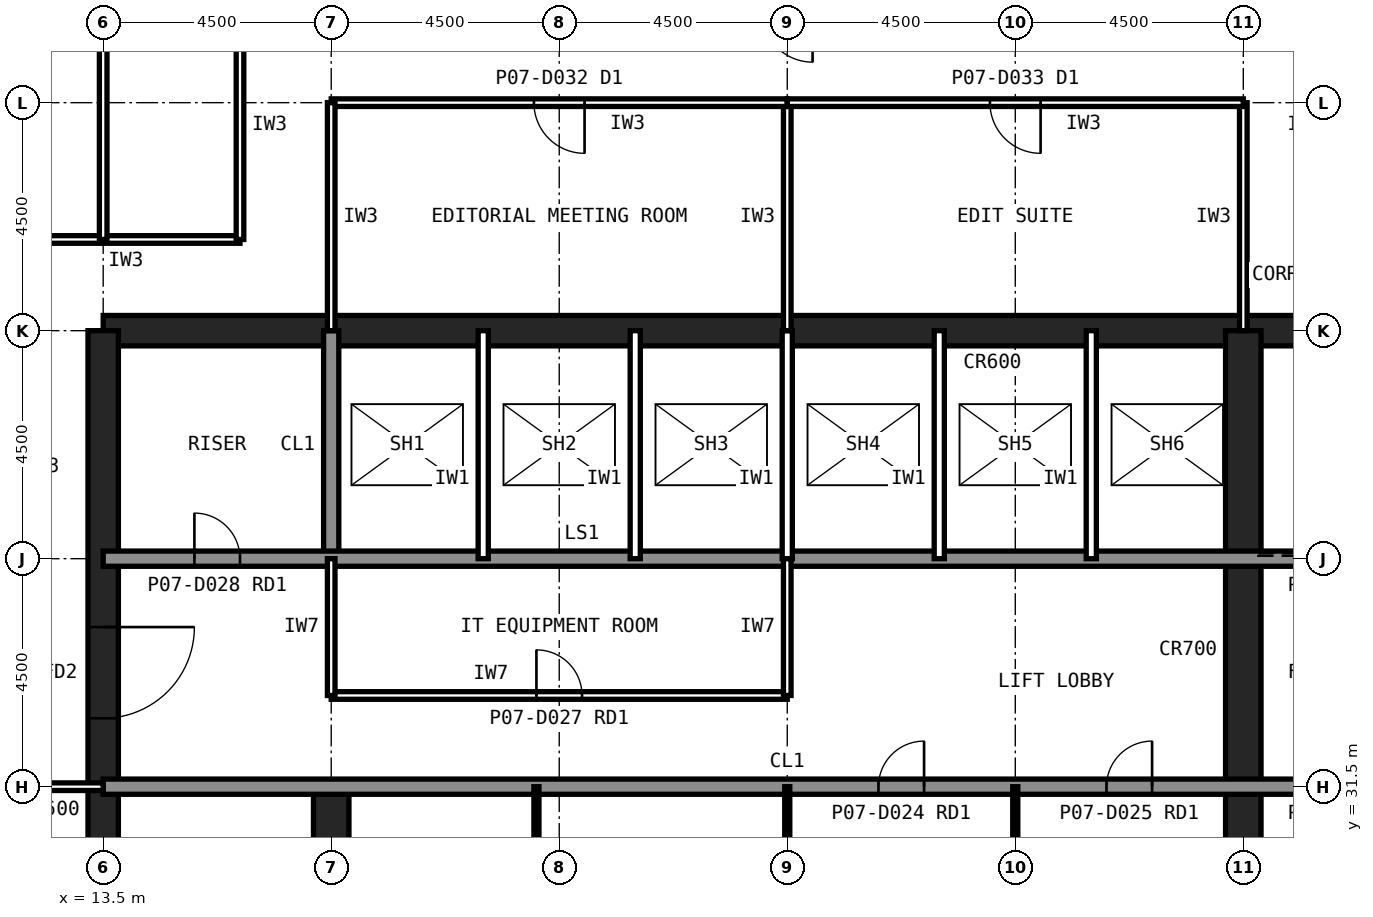
"""IFC4 building model, lengths in metres.
Left out: names, types, materials, properties, quantities, classifications, styles, units other than length and angle.
Written with IfcOpenShell. Run it as: python <this file> out.ifc"""

import sys

from ifc_helpers import new_model, si_unit, direction, frame, frame_2d, origin, place, context, subcontext, project, spatial, rectangle, extrude, element, fill, save


model = new_model("IFC4")
c1 = context("Model", 3, precision=1e-05, world=origin(), true_north=direction((0.0, 1.0)))
c2 = subcontext(c1, "Body", "Model", "MODEL_VIEW")
j1 = project(units=[si_unit("LENGTHUNIT", "METRE"), si_unit("PLANEANGLEUNIT", "RADIAN")], contexts=[c1])
p1 = place(None, origin())
s1 = spatial("IfcSite", under=j1, at=p1, CompositionType="ELEMENT")
p2 = place(p1, origin())
s2 = spatial("IfcBuilding", under=s1, at=p2, CompositionType="ELEMENT")
p3 = place(p2, frame((0.0, 0.0, 33.2)))
s3 = spatial("IfcBuildingStorey", under=s2, at=p3, CompositionType="ELEMENT", Elevation=33.2)
p4 = place(p3, frame((40.5, 40.5, 0.0), z_axis=(0.0, 0.0, 1.0), x_axis=(-1.0, 0.0, 0.0)))
e1 = element("IfcWall", 1, at=p4, inside=s3, PredefinedType="SHEAR", context=c2, shape_type="SweptSolid", body=[
    extrude(rectangle(XDim=27.0, YDim=0.6, at=frame_2d((13.5, 0.0))), origin(), (0.0, 0.0, 1.0), 4.2),
])
p5 = place(p3, frame((13.5, 40.5, 0.0), z_axis=(0.0, 0.0, 1.0), x_axis=(0.0, -1.0, 0.0)))
e2 = element("IfcWall", 2, at=p5, inside=s3, PredefinedType="SHEAR", context=c2, shape_type="SweptSolid", body=[
    extrude(rectangle(XDim=27.0, YDim=0.6, at=frame_2d((13.5, 0.0))), origin(), (0.0, 0.0, 1.0), 4.2),
])
p6 = place(p5, frame((19.65, 0.0, 0.0)))
e3 = element("IfcOpeningElement", 3, at=p6, cuts=e2, PredefinedType="OPENING", context=c2, shape_type="SweptSolid", body=[
    extrude(rectangle(XDim=1.2, YDim=2.1, at=frame_2d((0.6, 1.05))), frame((0.0, 0.31, 0.0), z_axis=(0.0, -1.0, 0.0), x_axis=(1.0, 0.0, 0.0)), (0.0, 0.0, 1.0), 0.62),
])
p7 = place(p5, frame((5.85, 0.0, 0.0)))
e4 = element("IfcOpeningElement", 4, at=p7, cuts=e2, PredefinedType="OPENING", context=c2, shape_type="SweptSolid", body=[
    extrude(rectangle(XDim=1.8, YDim=2.1, at=frame_2d((0.9, 1.05))), frame((0.0, 0.31, 0.0), z_axis=(0.0, -1.0, 0.0), x_axis=(1.0, 0.0, 0.0)), (0.0, 0.0, 1.0), 0.62),
])
p8 = place(p3, frame((18.0, 13.5, 0.0), z_axis=(0.0, 0.0, 1.0), x_axis=(0.0, 1.0, 0.0)))
e5 = element("IfcWall", 5, at=p8, inside=s3, PredefinedType="SHEAR", context=c2, shape_type="SweptSolid", body=[
    extrude(rectangle(XDim=18.0, YDim=0.7, at=frame_2d((9.0, 0.0))), origin(), (0.0, 0.0, 1.0), 4.2),
])
p9 = place(p3, frame((18.0, 36.0, 0.0), z_axis=(0.0, 0.0, 1.0), x_axis=(0.0, 1.0, 0.0)))
e6 = element("IfcWall", 6, at=p9, inside=s3, PredefinedType="SOLIDWALL", context=c2, shape_type="SweptSolid", body=[
    extrude(rectangle(XDim=4.5, YDim=0.3, at=frame_2d((2.25, 0.0))), origin(), (0.0, 0.0, 1.0), 4.04),
])
p10 = place(p3, frame((36.0, 22.5, 0.0), z_axis=(0.0, 0.0, 1.0), x_axis=(0.0, 1.0, 0.0)))
e7 = element("IfcWall", 7, at=p10, inside=s3, PredefinedType="SHEAR", context=c2, shape_type="SweptSolid", body=[
    extrude(rectangle(XDim=18.0, YDim=0.7, at=frame_2d((9.0, 0.0))), origin(), (0.0, 0.0, 1.0), 4.2),
])
p11 = place(p3, frame((13.5, 36.0, 0.0), z_axis=(0.0, 0.0, 1.0), x_axis=(1.0, 0.0, 0.0)))
e8 = element("IfcWall", 8, at=p11, inside=s3, PredefinedType="SOLIDWALL", context=c2, shape_type="SweptSolid", body=[
    extrude(rectangle(XDim=27.0, YDim=0.3, at=frame_2d((13.5, 0.0))), origin(), (0.0, 0.0, 1.0), 4.04),
])
p12 = place(p11, frame((1.8, 0.0, 0.0)))
e9 = element("IfcOpeningElement", 9, at=p12, cuts=e8, PredefinedType="OPENING", context=c2, shape_type="SweptSolid", body=[
    extrude(rectangle(XDim=0.9, YDim=2.1, at=frame_2d((0.45, 1.05))), frame((0.0, 0.16, 0.0), z_axis=(0.0, -1.0, 0.0), x_axis=(1.0, 0.0, 0.0)), (0.0, 0.0, 1.0), 0.32),
])
p13 = place(p11, frame((24.1, 0.0, 0.0)))
e10 = element("IfcOpeningElement", 10, at=p13, cuts=e8, PredefinedType="OPENING", context=c2, shape_type="SweptSolid", body=[
    extrude(rectangle(XDim=1.3, YDim=2.2, at=frame_2d((0.65, 1.1))), frame((0.0, 0.16, 0.0), z_axis=(0.0, -1.0, 0.0), x_axis=(1.0, 0.0, 0.0)), (0.0, 0.0, 1.0), 0.32),
])
p14 = place(p3, frame((13.5, 31.5, 0.0), z_axis=(0.0, 0.0, 1.0), x_axis=(1.0, 0.0, 0.0)))
e11 = element("IfcWall", 11, at=p14, inside=s3, PredefinedType="SOLIDWALL", context=c2, shape_type="SweptSolid", body=[
    extrude(rectangle(XDim=27.0, YDim=0.3, at=frame_2d((13.5, 0.0))), origin(), (0.0, 0.0, 1.0), 4.04),
])
p15 = place(p14, frame((24.15, 0.0, 0.0)))
e12 = element("IfcOpeningElement", 12, at=p15, cuts=e11, PredefinedType="OPENING", context=c2, shape_type="SweptSolid", body=[
    extrude(rectangle(XDim=1.2, YDim=2.1, at=frame_2d((0.6, 1.05))), frame((0.0, 0.16, 0.0), z_axis=(0.0, -1.0, 0.0), x_axis=(1.0, 0.0, 0.0)), (0.0, 0.0, 1.0), 0.32),
])
p16 = place(p14, frame((15.3, 0.0, 0.0)))
e13 = element("IfcOpeningElement", 13, at=p16, cuts=e11, PredefinedType="OPENING", context=c2, shape_type="SweptSolid", body=[
    extrude(rectangle(XDim=0.9, YDim=2.1, at=frame_2d((0.45, 1.05))), frame((0.0, 0.16, 0.0), z_axis=(0.0, -1.0, 0.0), x_axis=(1.0, 0.0, 0.0)), (0.0, 0.0, 1.0), 0.32),
])
p17 = place(p14, frame((19.8, 0.0, 0.0)))
e14 = element("IfcOpeningElement", 14, at=p17, cuts=e11, PredefinedType="OPENING", context=c2, shape_type="SweptSolid", body=[
    extrude(rectangle(XDim=0.9, YDim=2.1, at=frame_2d((0.45, 1.05))), frame((0.0, 0.16, 0.0), z_axis=(0.0, -1.0, 0.0), x_axis=(1.0, 0.0, 0.0)), (0.0, 0.0, 1.0), 0.32),
])
for number, where, z_axis, x_axis in (
    (15, (21.0, 36.0, 0.0), (0.0, 0.0, 1.0), (0.0, 1.0, 0.0)),
    (16, (24.0, 36.0, 0.0), (0.0, 0.0, 1.0), (0.0, 1.0, 0.0)),
    (17, (27.0, 36.0, 0.0), (0.0, 0.0, 1.0), (0.0, 1.0, 0.0)),
    (18, (30.0, 36.0, 0.0), (0.0, 0.0, 1.0), (0.0, 1.0, 0.0)),
    (19, (33.0, 36.0, 0.0), (0.0, 0.0, 1.0), (0.0, 1.0, 0.0)),
):
    element("IfcWall", number, at=place(p3, frame(where, z_axis=z_axis, x_axis=x_axis)), inside=s3, PredefinedType="PARTITIONING", context=c2, shape_type="SweptSolid", body=[
        extrude(rectangle(XDim=4.5, YDim=0.2, at=frame_2d((2.25, 0.0))), origin(), (0.0, 0.0, 1.0), 4.04),
    ])
for number, where, z_axis, x_axis in (
    (20, (22.05, 22.5, 0.0), (0.0, 0.0, 1.0), (0.0, 1.0, 0.0)),
    (21, (27.0, 22.5, 0.0), (0.0, 0.0, 1.0), (0.0, 1.0, 0.0)),
    (22, (31.5, 22.5, 0.0), (0.0, 0.0, 1.0), (0.0, 1.0, 0.0)),
):
    element("IfcWall", number, at=place(p3, frame(where, z_axis=z_axis, x_axis=x_axis)), inside=s3, PredefinedType="PLUMBINGWALL", context=c2, shape_type="SweptSolid", body=[
        extrude(rectangle(XDim=9.0, YDim=0.1, at=frame_2d((4.5, 0.0))), origin(), (0.0, 0.0, 1.0), 4.04),
    ])
p18 = place(p3, frame((18.0, 33.3, 0.0), z_axis=(0.0, 0.0, 1.0), x_axis=(1.0, 0.0, 0.0)))
e23 = element("IfcWall", 23, at=p18, inside=s3, PredefinedType="PARTITIONING", context=c2, shape_type="SweptSolid", body=[
    extrude(rectangle(XDim=9.0, YDim=0.15, at=frame_2d((4.5, 0.0))), origin(), (0.0, 0.0, 1.0), 4.04),
])
p19 = place(p18, frame((4.05, 0.0, 0.0)))
e24 = element("IfcOpeningElement", 24, at=p19, cuts=e23, PredefinedType="OPENING", context=c2, shape_type="SweptSolid", body=[
    extrude(rectangle(XDim=0.9, YDim=2.1, at=frame_2d((0.45, 1.05))), frame((0.0, 0.085, 0.0), z_axis=(0.0, -1.0, 0.0), x_axis=(1.0, 0.0, 0.0)), (0.0, 0.0, 1.0), 0.17),
])
for number, where, z_axis, x_axis in (
    (25, (18.0, 33.3, 0.0), (0.0, 0.0, 1.0), (0.0, 1.0, 0.0)),
    (26, (27.0, 33.3, 0.0), (0.0, 0.0, 1.0), (0.0, 1.0, 0.0)),
):
    element("IfcWall", number, at=place(p3, frame(where, z_axis=z_axis, x_axis=x_axis)), inside=s3, PredefinedType="PARTITIONING", context=c2, shape_type="SweptSolid", body=[
        extrude(rectangle(XDim=2.7, YDim=0.15, at=frame_2d((1.35, 0.0))), origin(), (0.0, 0.0, 1.0), 4.04),
    ])
for number, where, z_axis, x_axis in (
    (27, (16.2, 42.3, 0.0), (0.0, 0.0, 1.0), (-1.0, 0.0, 0.0)),
    (28, (16.2, 46.8, 0.0), (0.0, 0.0, 1.0), (0.0, -1.0, 0.0)),
):
    element("IfcWall", number, at=place(p3, frame(where, z_axis=z_axis, x_axis=x_axis)), inside=s3, PredefinedType="PARTITIONING", context=c2, shape_type="SweptSolid", body=[
        extrude(rectangle(XDim=4.5, YDim=0.15, at=frame_2d((2.25, 0.0))), origin(), (0.0, 0.0, 1.0), 4.04),
    ])
p20 = place(p3, frame((27.0, 40.5, 0.0), z_axis=(0.0, 0.0, 1.0), x_axis=(0.0, 1.0, 0.0)))
e29 = element("IfcWall", 29, at=p20, inside=s3, PredefinedType="PARTITIONING", context=c2, shape_type="SweptSolid", body=[
    extrude(rectangle(XDim=4.5, YDim=0.15, at=frame_2d((2.25, 0.0))), origin(), (0.0, 0.0, 1.0), 3.189),
])
p21 = place(p3, frame((27.0, 45.0, 0.0), z_axis=(0.0, 0.0, 1.0), x_axis=(-1.0, 0.0, 0.0)))
e30 = element("IfcWall", 30, at=p21, inside=s3, PredefinedType="PARTITIONING", context=c2, shape_type="SweptSolid", body=[
    extrude(rectangle(XDim=9.0, YDim=0.15, at=frame_2d((4.5, 0.0))), origin(), (0.0, 0.0, 1.0), 4.04),
])
p22 = place(p21, frame((4.0, 0.0, 0.0)))
e31 = element("IfcOpeningElement", 31, at=p22, cuts=e30, PredefinedType="OPENING", context=c2, shape_type="SweptSolid", body=[
    extrude(rectangle(XDim=1.0, YDim=2.1, at=frame_2d((0.5, 1.05))), frame((0.0, 0.085, 0.0), z_axis=(0.0, -1.0, 0.0), x_axis=(1.0, 0.0, 0.0)), (0.0, 0.0, 1.0), 0.17),
])
for number, where, z_axis, x_axis in (
    (32, (18.0, 45.0, 0.0), (0.0, 0.0, 1.0), (0.0, -1.0, 0.0)),
    (33, (36.0, 40.5, 0.0), (0.0, 0.0, 1.0), (0.0, 1.0, 0.0)),
):
    element("IfcWall", number, at=place(p3, frame(where, z_axis=z_axis, x_axis=x_axis)), inside=s3, PredefinedType="PARTITIONING", context=c2, shape_type="SweptSolid", body=[
        extrude(rectangle(XDim=4.5, YDim=0.15, at=frame_2d((2.25, 0.0))), origin(), (0.0, 0.0, 1.0), 3.189),
    ])
p23 = place(p3, frame((36.0, 45.0, 0.0), z_axis=(0.0, 0.0, 1.0), x_axis=(-1.0, 0.0, 0.0)))
e34 = element("IfcWall", 34, at=p23, inside=s3, PredefinedType="PARTITIONING", context=c2, shape_type="SweptSolid", body=[
    extrude(rectangle(XDim=9.0, YDim=0.15, at=frame_2d((4.5, 0.0))), origin(), (0.0, 0.0, 1.0), 4.04),
])
p24 = place(p23, frame((4.0, 0.0, 0.0)))
e35 = element("IfcOpeningElement", 35, at=p24, cuts=e34, PredefinedType="OPENING", context=c2, shape_type="SweptSolid", body=[
    extrude(rectangle(XDim=1.0, YDim=2.1, at=frame_2d((0.5, 1.05))), frame((0.0, 0.085, 0.0), z_axis=(0.0, -1.0, 0.0), x_axis=(1.0, 0.0, 0.0)), (0.0, 0.0, 1.0), 0.17),
])
p25 = place(p3, frame((13.5, 31.5, 0.0), z_axis=(0.0, 0.0, 1.0), x_axis=(-1.0, 0.0, 0.0)))
e36 = element("IfcWall", 36, at=p25, inside=s3, PredefinedType="PARTITIONING", context=c2, shape_type="SweptSolid", body=[
    extrude(rectangle(XDim=4.5, YDim=0.15, at=frame_2d((2.25, 0.0))), origin(), (0.0, 0.0, 1.0), 3.189),
])
p26 = place(p3, frame((13.5, 42.3, 0.0), z_axis=(0.0, 0.0, 1.0), x_axis=(0.0, 1.0, 0.0)))
e37 = element("IfcWall", 37, at=p26, inside=s3, PredefinedType="PARTITIONING", context=c2, shape_type="SweptSolid", body=[
    extrude(rectangle(XDim=11.23, YDim=0.15, at=frame_2d((5.615, 0.0))), origin(), (0.0, 0.0, 1.0), 3.189),
])
p27 = place(p26, frame((5.115, 0.0, 0.0)))
e38 = element("IfcOpeningElement", 38, at=p27, cuts=e37, PredefinedType="OPENING", context=c2, shape_type="SweptSolid", body=[
    extrude(rectangle(XDim=1.0, YDim=2.1, at=frame_2d((0.5, 1.05))), frame((0.0, 0.085, 0.0), z_axis=(0.0, -1.0, 0.0), x_axis=(1.0, 0.0, 0.0)), (0.0, 0.0, 1.0), 0.17),
])
p28 = place(p7, origin())
e39 = element("IfcDoor", 39, at=p28, inside=s3, OperationType="SINGLE_SWING_LEFT", PredefinedType="DOOR", context=c2, shape_type="SweptSolid", body=[
    extrude(rectangle(XDim=1.8, YDim=2.1, at=frame_2d((0.9, 1.05))), frame((0.0, 0.025, 0.0), z_axis=(0.0, -1.0, 0.0), x_axis=(1.0, 0.0, 0.0)), (0.0, 0.0, 1.0), 0.05),
])
fill(e4, e39)
p29 = place(p16, origin())
e40 = element("IfcDoor", 40, at=p29, inside=s3, OperationType="SINGLE_SWING_RIGHT", PredefinedType="DOOR", context=c2, shape_type="SweptSolid", body=[
    extrude(rectangle(XDim=0.9, YDim=2.1, at=frame_2d((0.45, 1.05))), frame((0.0, 0.025, 0.0), z_axis=(0.0, -1.0, 0.0), x_axis=(1.0, 0.0, 0.0)), (0.0, 0.0, 1.0), 0.05),
])
fill(e13, e40)
p30 = place(p17, origin())
e41 = element("IfcDoor", 41, at=p30, inside=s3, OperationType="SINGLE_SWING_RIGHT", PredefinedType="DOOR", context=c2, shape_type="SweptSolid", body=[
    extrude(rectangle(XDim=0.9, YDim=2.1, at=frame_2d((0.45, 1.05))), frame((0.0, 0.025, 0.0), z_axis=(0.0, -1.0, 0.0), x_axis=(1.0, 0.0, 0.0)), (0.0, 0.0, 1.0), 0.05),
])
fill(e14, e41)
p31 = place(p12, origin())
e42 = element("IfcDoor", 42, at=p31, inside=s3, OperationType="SINGLE_SWING_LEFT", PredefinedType="DOOR", context=c2, shape_type="SweptSolid", body=[
    extrude(rectangle(XDim=0.9, YDim=2.1, at=frame_2d((0.45, 1.05))), frame((0.0, 0.025, 0.0), z_axis=(0.0, -1.0, 0.0), x_axis=(1.0, 0.0, 0.0)), (0.0, 0.0, 1.0), 0.05),
])
fill(e9, e42)
p32 = place(p19, origin())
e43 = element("IfcDoor", 43, at=p32, inside=s3, OperationType="SINGLE_SWING_LEFT", PredefinedType="DOOR", context=c2, shape_type="SweptSolid", body=[
    extrude(rectangle(XDim=0.9, YDim=2.1, at=frame_2d((0.45, 1.05))), frame((0.0, 0.025, 0.0), z_axis=(0.0, -1.0, 0.0), x_axis=(1.0, 0.0, 0.0)), (0.0, 0.0, 1.0), 0.05),
])
fill(e24, e43)
p33 = place(p22, origin())
e44 = element("IfcDoor", 44, at=p33, inside=s3, OperationType="SINGLE_SWING_LEFT", PredefinedType="DOOR", context=c2, shape_type="SweptSolid", body=[
    extrude(rectangle(XDim=1.0, YDim=2.1, at=frame_2d((0.5, 1.05))), frame((0.0, 0.025, 0.0), z_axis=(0.0, -1.0, 0.0), x_axis=(1.0, 0.0, 0.0)), (0.0, 0.0, 1.0), 0.05),
])
fill(e31, e44)
p34 = place(p24, origin())
e45 = element("IfcDoor", 45, at=p34, inside=s3, OperationType="SINGLE_SWING_LEFT", PredefinedType="DOOR", context=c2, shape_type="SweptSolid", body=[
    extrude(rectangle(XDim=1.0, YDim=2.1, at=frame_2d((0.5, 1.05))), frame((0.0, 0.025, 0.0), z_axis=(0.0, -1.0, 0.0), x_axis=(1.0, 0.0, 0.0)), (0.0, 0.0, 1.0), 0.05),
])
fill(e35, e45)
save(model, sys.argv[1])
